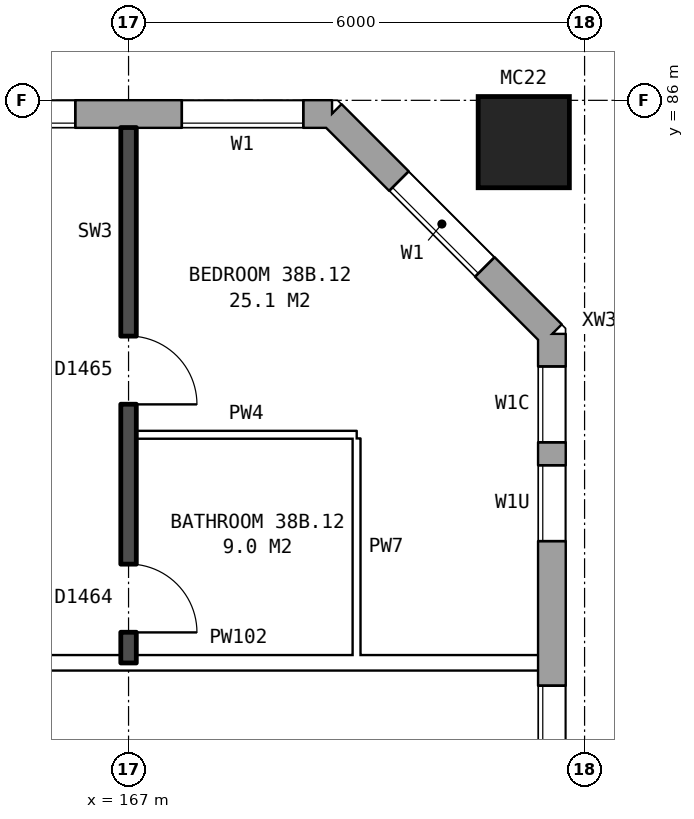
"""IFC4 building model, lengths in metres.
Left out: names, types, materials, properties, quantities, classifications, styles, units other than length and angle.
Written with IfcOpenShell. Run it as: python <this file> out.ifc"""

import sys

from ifc_helpers import new_model, si_unit, direction, frame, frame_2d, origin, origin_2d, place, context, subcontext, project, spatial, rectangle, hollow_rectangle, extrude, element, fill, save


model = new_model("IFC4")
c1 = context("Model", 3, precision=1e-05, world=origin(), true_north=direction((0.0, 1.0)))
c2 = subcontext(c1, "Body", "Model", "MODEL_VIEW")
j1 = project(units=[si_unit("LENGTHUNIT", "METRE"), si_unit("PLANEANGLEUNIT", "RADIAN")], contexts=[c1])
p1 = place(None, origin())
s1 = spatial("IfcSite", under=j1, at=p1, CompositionType="ELEMENT")
p2 = place(p1, origin())
s2 = spatial("IfcBuilding", under=s1, at=p2, CompositionType="ELEMENT")
p3 = place(p2, frame((0.0, 0.0, 136.1)))
s3 = spatial("IfcBuildingStorey", under=s2, at=p3, CompositionType="ELEMENT", Elevation=136.1)
p4 = place(p3, frame((172.2, 85.45, 0.0), z_axis=(0.0, 0.0, 1.0), x_axis=(1.0, 0.0, 0.0)))
e1 = element("IfcColumn", 1, at=p4, inside=s3, PredefinedType="COLUMN", context=c2, shape_type="SweptSolid", body=[
    extrude(hollow_rectangle(XDim=1.2, YDim=1.2, WallThickness=0.065, at=origin_2d()), origin(), (0.0, 0.0, 1.0), 3.1),
])
p5 = place(p3, frame((172.57, 57.075, 0.0), z_axis=(0.0, 0.0, 1.0), x_axis=(0.0, 1.0, 0.0)))
e2 = element("IfcWall", 2, at=p5, inside=s3, PredefinedType="STANDARD", context=c2, shape_type="SweptSolid", body=[
    extrude(rectangle(XDim=25.851, YDim=0.36, at=frame_2d((12.925, 0.0))), origin(), (0.0, 0.0, 1.0), 2.85),
])
p6 = place(p5, frame((0.3, 0.0, 0.8)))
e3 = element("IfcOpeningElement", 3, at=p6, cuts=e2, PredefinedType="OPENING", context=c2, shape_type="SweptSolid", body=[
    extrude(rectangle(XDim=1.2, YDim=1.8, at=frame_2d((0.6, 0.9))), frame((0.0, 0.19, 0.0), z_axis=(0.0, -1.0, 0.0), x_axis=(1.0, 0.0, 0.0)), (0.0, 0.0, 1.0), 0.38),
])
p7 = place(p5, frame((4.625, 0.0, 0.8)))
e4 = element("IfcOpeningElement", 4, at=p7, cuts=e2, PredefinedType="OPENING", context=c2, shape_type="SweptSolid", body=[
    extrude(rectangle(XDim=1.6, YDim=1.8, at=frame_2d((0.8, 0.9))), frame((0.0, 0.19, 0.0), z_axis=(0.0, -1.0, 0.0), x_axis=(1.0, 0.0, 0.0)), (0.0, 0.0, 1.0), 0.38),
])
p8 = place(p5, frame((7.625, 0.0, 0.8)))
e5 = element("IfcOpeningElement", 5, at=p8, cuts=e2, PredefinedType="OPENING", context=c2, shape_type="SweptSolid", body=[
    extrude(rectangle(XDim=1.6, YDim=1.8, at=frame_2d((0.8, 0.9))), frame((0.0, 0.19, 0.0), z_axis=(0.0, -1.0, 0.0), x_axis=(1.0, 0.0, 0.0)), (0.0, 0.0, 1.0), 0.38),
])
p9 = place(p5, frame((10.625, 0.0, 0.8)))
e6 = element("IfcOpeningElement", 6, at=p9, cuts=e2, PredefinedType="OPENING", context=c2, shape_type="SweptSolid", body=[
    extrude(rectangle(XDim=1.6, YDim=1.8, at=frame_2d((0.8, 0.9))), frame((0.0, 0.19, 0.0), z_axis=(0.0, -1.0, 0.0), x_axis=(1.0, 0.0, 0.0)), (0.0, 0.0, 1.0), 0.38),
])
p10 = place(p5, frame((13.625, 0.0, 0.8)))
e7 = element("IfcOpeningElement", 7, at=p10, cuts=e2, PredefinedType="OPENING", context=c2, shape_type="SweptSolid", body=[
    extrude(rectangle(XDim=1.6, YDim=1.8, at=frame_2d((0.8, 0.9))), frame((0.0, 0.19, 0.0), z_axis=(0.0, -1.0, 0.0), x_axis=(1.0, 0.0, 0.0)), (0.0, 0.0, 1.0), 0.38),
])
p11 = place(p5, frame((16.625, 0.0, 0.8)))
e8 = element("IfcOpeningElement", 8, at=p11, cuts=e2, PredefinedType="OPENING", context=c2, shape_type="SweptSolid", body=[
    extrude(rectangle(XDim=1.6, YDim=1.8, at=frame_2d((0.8, 0.9))), frame((0.0, 0.19, 0.0), z_axis=(0.0, -1.0, 0.0), x_axis=(1.0, 0.0, 0.0)), (0.0, 0.0, 1.0), 0.38),
])
p12 = place(p5, frame((19.625, 0.0, 0.8)))
e9 = element("IfcOpeningElement", 9, at=p12, cuts=e2, PredefinedType="OPENING", context=c2, shape_type="SweptSolid", body=[
    extrude(rectangle(XDim=1.6, YDim=1.8, at=frame_2d((0.8, 0.9))), frame((0.0, 0.19, 0.0), z_axis=(0.0, -1.0, 0.0), x_axis=(1.0, 0.0, 0.0)), (0.0, 0.0, 1.0), 0.38),
])
p13 = place(p5, frame((23.125, 0.0, 0.8)))
e10 = element("IfcOpeningElement", 10, at=p13, cuts=e2, PredefinedType="OPENING", context=c2, shape_type="SweptSolid", body=[
    extrude(rectangle(XDim=1.0, YDim=0.9, at=frame_2d((0.5, 0.45))), frame((0.0, 0.19, 0.0), z_axis=(0.0, -1.0, 0.0), x_axis=(1.0, 0.0, 0.0)), (0.0, 0.0, 1.0), 0.38),
])
p14 = place(p5, frame((1.8, 0.0, 0.8)))
e11 = element("IfcOpeningElement", 11, at=p14, cuts=e2, PredefinedType="OPENING", context=c2, shape_type="SweptSolid", body=[
    extrude(rectangle(XDim=0.8, YDim=0.9, at=frame_2d((0.4, 0.45))), frame((0.0, 0.19, 0.0), z_axis=(0.0, -1.0, 0.0), x_axis=(1.0, 0.0, 0.0)), (0.0, 0.0, 1.0), 0.38),
])
p15 = place(p5, frame((24.425, 0.0, 0.8)))
e12 = element("IfcOpeningElement", 12, at=p15, cuts=e2, PredefinedType="OPENING", context=c2, shape_type="SweptSolid", body=[
    extrude(rectangle(XDim=1.0, YDim=1.8, at=frame_2d((0.5, 0.9))), frame((0.0, 0.19, 0.0), z_axis=(0.0, -1.0, 0.0), x_axis=(1.0, 0.0, 0.0)), (0.0, 0.0, 1.0), 0.38),
])
p16 = place(p3, frame((172.57, 82.925, 0.0), z_axis=(0.0, 0.0, 1.0), x_axis=(-0.707106781187, 0.707106781187, 0.0)))
e13 = element("IfcWall", 13, at=p16, inside=s3, PredefinedType="STANDARD", context=c2, shape_type="SweptSolid", body=[
    extrude(rectangle(XDim=4.094, YDim=0.36, at=frame_2d((2.047, 0.0))), origin(), (0.0, 0.0, 1.0), 2.85),
])
p17 = place(p16, frame((1.247, 0.0, 0.8)))
e14 = element("IfcOpeningElement", 14, at=p17, cuts=e13, PredefinedType="OPENING", context=c2, shape_type="SweptSolid", body=[
    extrude(rectangle(XDim=1.6, YDim=1.8, at=frame_2d((0.8, 0.9))), frame((0.0, 0.19, 0.0), z_axis=(0.0, -1.0, 0.0), x_axis=(1.0, 0.0, 0.0)), (0.0, 0.0, 1.0), 0.38),
])
p18 = place(p3, frame((169.675, 85.82, 0.0), z_axis=(0.0, 0.0, 1.0), x_axis=(-1.0, 0.0, 0.0)))
e15 = element("IfcWall", 15, at=p18, inside=s3, PredefinedType="STANDARD", context=c2, shape_type="SweptSolid", body=[
    extrude(rectangle(XDim=35.601, YDim=0.36, at=frame_2d((17.8, 0.0))), origin(), (0.0, 0.0, 1.0), 2.85),
])
p19 = place(p18, frame((0.375, 0.0, 0.8)))
e16 = element("IfcOpeningElement", 16, at=p19, cuts=e15, PredefinedType="OPENING", context=c2, shape_type="SweptSolid", body=[
    extrude(rectangle(XDim=1.6, YDim=1.8, at=frame_2d((0.8, 0.9))), frame((0.0, 0.19, 0.0), z_axis=(0.0, -1.0, 0.0), x_axis=(1.0, 0.0, 0.0)), (0.0, 0.0, 1.0), 0.38),
])
p20 = place(p18, frame((3.375, 0.0, 0.8)))
e17 = element("IfcOpeningElement", 17, at=p20, cuts=e15, PredefinedType="OPENING", context=c2, shape_type="SweptSolid", body=[
    extrude(rectangle(XDim=1.6, YDim=1.8, at=frame_2d((0.8, 0.9))), frame((0.0, 0.19, 0.0), z_axis=(0.0, -1.0, 0.0), x_axis=(1.0, 0.0, 0.0)), (0.0, 0.0, 1.0), 0.38),
])
p21 = place(p18, frame((6.375, 0.0, 0.8)))
e18 = element("IfcOpeningElement", 18, at=p21, cuts=e15, PredefinedType="OPENING", context=c2, shape_type="SweptSolid", body=[
    extrude(rectangle(XDim=1.6, YDim=1.8, at=frame_2d((0.8, 0.9))), frame((0.0, 0.19, 0.0), z_axis=(0.0, -1.0, 0.0), x_axis=(1.0, 0.0, 0.0)), (0.0, 0.0, 1.0), 0.38),
])
p22 = place(p18, frame((9.375, 0.0, 0.8)))
e19 = element("IfcOpeningElement", 19, at=p22, cuts=e15, PredefinedType="OPENING", context=c2, shape_type="SweptSolid", body=[
    extrude(rectangle(XDim=1.6, YDim=1.8, at=frame_2d((0.8, 0.9))), frame((0.0, 0.19, 0.0), z_axis=(0.0, -1.0, 0.0), x_axis=(1.0, 0.0, 0.0)), (0.0, 0.0, 1.0), 0.38),
])
p23 = place(p18, frame((11.275, 0.0, 0.8)))
e20 = element("IfcOpeningElement", 20, at=p23, cuts=e15, PredefinedType="OPENING", context=c2, shape_type="SweptSolid", body=[
    extrude(rectangle(XDim=1.2, YDim=1.8, at=frame_2d((0.6, 0.9))), frame((0.0, 0.19, 0.0), z_axis=(0.0, -1.0, 0.0), x_axis=(1.0, 0.0, 0.0)), (0.0, 0.0, 1.0), 0.38),
])
p24 = place(p18, frame((15.375, 0.0, 0.8)))
e21 = element("IfcOpeningElement", 21, at=p24, cuts=e15, PredefinedType="OPENING", context=c2, shape_type="SweptSolid", body=[
    extrude(rectangle(XDim=1.6, YDim=1.8, at=frame_2d((0.8, 0.9))), frame((0.0, 0.19, 0.0), z_axis=(0.0, -1.0, 0.0), x_axis=(1.0, 0.0, 0.0)), (0.0, 0.0, 1.0), 0.38),
])
p25 = place(p18, frame((18.375, 0.0, 0.8)))
e22 = element("IfcOpeningElement", 22, at=p25, cuts=e15, PredefinedType="OPENING", context=c2, shape_type="SweptSolid", body=[
    extrude(rectangle(XDim=1.6, YDim=1.8, at=frame_2d((0.8, 0.9))), frame((0.0, 0.19, 0.0), z_axis=(0.0, -1.0, 0.0), x_axis=(1.0, 0.0, 0.0)), (0.0, 0.0, 1.0), 0.38),
])
p26 = place(p18, frame((20.875, 0.0, 0.35)))
e23 = element("IfcOpeningElement", 23, at=p26, cuts=e15, PredefinedType="OPENING", context=c2, shape_type="SweptSolid", body=[
    extrude(rectangle(XDim=0.6, YDim=0.9, at=frame_2d((0.3, 0.45))), frame((0.0, 0.19, 0.0), z_axis=(0.0, -1.0, 0.0), x_axis=(1.0, 0.0, 0.0)), (0.0, 0.0, 1.0), 0.38),
])
p27 = place(p18, frame((24.375, 0.0, 0.8)))
e24 = element("IfcOpeningElement", 24, at=p27, cuts=e15, PredefinedType="OPENING", context=c2, shape_type="SweptSolid", body=[
    extrude(rectangle(XDim=1.6, YDim=1.8, at=frame_2d((0.8, 0.9))), frame((0.0, 0.19, 0.0), z_axis=(0.0, -1.0, 0.0), x_axis=(1.0, 0.0, 0.0)), (0.0, 0.0, 1.0), 0.38),
])
p28 = place(p18, frame((27.375, 0.0, 0.8)))
e25 = element("IfcOpeningElement", 25, at=p28, cuts=e15, PredefinedType="OPENING", context=c2, shape_type="SweptSolid", body=[
    extrude(rectangle(XDim=1.6, YDim=1.8, at=frame_2d((0.8, 0.9))), frame((0.0, 0.19, 0.0), z_axis=(0.0, -1.0, 0.0), x_axis=(1.0, 0.0, 0.0)), (0.0, 0.0, 1.0), 0.38),
])
p29 = place(p18, frame((30.375, 0.0, 0.8)))
e26 = element("IfcOpeningElement", 26, at=p29, cuts=e15, PredefinedType="OPENING", context=c2, shape_type="SweptSolid", body=[
    extrude(rectangle(XDim=1.6, YDim=1.8, at=frame_2d((0.8, 0.9))), frame((0.0, 0.19, 0.0), z_axis=(0.0, -1.0, 0.0), x_axis=(1.0, 0.0, 0.0)), (0.0, 0.0, 1.0), 0.38),
])
p30 = place(p18, frame((33.375, 0.0, 0.8)))
e27 = element("IfcOpeningElement", 27, at=p30, cuts=e15, PredefinedType="OPENING", context=c2, shape_type="SweptSolid", body=[
    extrude(rectangle(XDim=1.6, YDim=1.8, at=frame_2d((0.8, 0.9))), frame((0.0, 0.19, 0.0), z_axis=(0.0, -1.0, 0.0), x_axis=(1.0, 0.0, 0.0)), (0.0, 0.0, 1.0), 0.38),
])
p31 = place(p18, frame((12.775, 0.0, 1.6)))
e28 = element("IfcOpeningElement", 28, at=p31, cuts=e15, PredefinedType="OPENING", context=c2, shape_type="SweptSolid", body=[
    extrude(rectangle(XDim=0.6, YDim=0.9, at=frame_2d((0.3, 0.45))), frame((0.0, 0.19, 0.0), z_axis=(0.0, -1.0, 0.0), x_axis=(1.0, 0.0, 0.0)), (0.0, 0.0, 1.0), 0.38),
])
p32 = place(p18, frame((22.425, 0.0, 1.35)))
e29 = element("IfcOpeningElement", 29, at=p32, cuts=e15, PredefinedType="OPENING", context=c2, shape_type="SweptSolid", body=[
    extrude(rectangle(XDim=1.0, YDim=1.2, at=frame_2d((0.5, 0.6))), frame((0.0, 0.19, 0.0), z_axis=(0.0, -1.0, 0.0), x_axis=(1.0, 0.0, 0.0)), (0.0, 0.0, 1.0), 0.38),
])
p33 = place(p3, frame((155.1, 78.6, 0.0), z_axis=(0.0, 0.0, 1.0), x_axis=(1.0, 0.0, 0.0)))
e30 = element("IfcWall", 30, at=p33, inside=s3, PredefinedType="PARTITIONING", context=c2, shape_type="SweptSolid", body=[
    extrude(rectangle(XDim=17.29, YDim=0.2, at=frame_2d((8.645, 0.0))), origin(), (0.0, 0.0, 1.0), 2.85),
])
p34 = place(p33, frame((1.45, 0.0, 0.0)))
e31 = element("IfcOpeningElement", 31, at=p34, cuts=e30, PredefinedType="OPENING", context=c2, shape_type="SweptSolid", body=[
    extrude(rectangle(XDim=1.0, YDim=2.1, at=frame_2d((0.5, 1.05))), frame((0.0, 0.11, 0.0), z_axis=(0.0, -1.0, 0.0), x_axis=(1.0, 0.0, 0.0)), (0.0, 0.0, 1.0), 0.22),
])
p35 = place(p33, frame((8.4, 0.0, 0.0)))
e32 = element("IfcOpeningElement", 32, at=p35, cuts=e30, PredefinedType="OPENING", context=c2, shape_type="SweptSolid", body=[
    extrude(rectangle(XDim=1.0, YDim=2.1, at=frame_2d((0.5, 1.05))), frame((0.0, 0.11, 0.0), z_axis=(0.0, -1.0, 0.0), x_axis=(1.0, 0.0, 0.0)), (0.0, 0.0, 1.0), 0.22),
])
p36 = place(p3, frame((167.1, 81.6, 0.0), z_axis=(0.0, 0.0, 1.0), x_axis=(1.0, 0.0, 0.0)))
e33 = element("IfcWall", 33, at=p36, inside=s3, PredefinedType="PARTITIONING", context=c2, shape_type="SweptSolid", body=[
    extrude(rectangle(XDim=2.9, YDim=0.1, at=frame_2d((1.45, 0.0))), origin(), (0.0, 0.0, 1.0), 2.85),
])
p37 = place(p3, frame((167.0, 78.6, 0.0), z_axis=(0.0, 0.0, 1.0), x_axis=(0.0, 1.0, 0.0)))
e34 = element("IfcWall", 34, at=p37, inside=s3, PredefinedType="SOLIDWALL", context=c2, shape_type="SweptSolid", body=[
    extrude(rectangle(XDim=7.04, YDim=0.2, at=frame_2d((3.52, 0.0))), origin(), (0.0, 0.0, 1.0), 2.85),
])
p38 = place(p37, frame((3.4, 0.0, 0.0)))
e35 = element("IfcOpeningElement", 35, at=p38, cuts=e34, PredefinedType="OPENING", context=c2, shape_type="SweptSolid", body=[
    extrude(rectangle(XDim=0.9, YDim=2.1, at=frame_2d((0.45, 1.05))), frame((0.0, 0.11, 0.0), z_axis=(0.0, -1.0, 0.0), x_axis=(1.0, 0.0, 0.0)), (0.0, 0.0, 1.0), 0.22),
])
p39 = place(p37, frame((0.4, 0.0, 0.0)))
e36 = element("IfcOpeningElement", 36, at=p39, cuts=e34, PredefinedType="OPENING", context=c2, shape_type="SweptSolid", body=[
    extrude(rectangle(XDim=0.9, YDim=2.1, at=frame_2d((0.45, 1.05))), frame((0.0, 0.11, 0.0), z_axis=(0.0, -1.0, 0.0), x_axis=(1.0, 0.0, 0.0)), (0.0, 0.0, 1.0), 0.22),
])
p40 = place(p3, frame((170.0, 78.7, 0.0), z_axis=(0.0, 0.0, 1.0), x_axis=(0.0, 1.0, 0.0)))
e37 = element("IfcWall", 37, at=p40, inside=s3, PredefinedType="PARTITIONING", context=c2, shape_type="SweptSolid", body=[
    extrude(rectangle(XDim=2.85, YDim=0.1, at=frame_2d((1.425, 0.0))), origin(), (0.0, 0.0, 1.0), 2.85),
])
p41 = place(p12, origin())
e38 = element("IfcWindow", 38, at=p41, inside=s3, PartitioningType="SINGLE_PANEL", PredefinedType="WINDOW", context=c2, shape_type="SweptSolid", body=[
    extrude(rectangle(XDim=1.6, YDim=1.8, at=frame_2d((0.8, 0.9))), frame((0.0, 0.15, 0.0), z_axis=(0.0, -1.0, 0.0), x_axis=(1.0, 0.0, 0.0)), (0.0, 0.0, 1.0), 0.06),
])
fill(e9, e38)
p42 = place(p13, origin())
e39 = element("IfcWindow", 39, at=p42, inside=s3, PartitioningType="SINGLE_PANEL", PredefinedType="WINDOW", context=c2, shape_type="SweptSolid", body=[
    extrude(rectangle(XDim=1.0, YDim=0.9, at=frame_2d((0.5, 0.45))), frame((0.0, 0.15, 0.0), z_axis=(0.0, -1.0, 0.0), x_axis=(1.0, 0.0, 0.0)), (0.0, 0.0, 1.0), 0.06),
])
fill(e10, e39)
p43 = place(p17, origin())
e40 = element("IfcWindow", 40, at=p43, inside=s3, PartitioningType="SINGLE_PANEL", PredefinedType="WINDOW", context=c2, shape_type="SweptSolid", body=[
    extrude(rectangle(XDim=1.6, YDim=1.8, at=frame_2d((0.8, 0.9))), frame((0.0, 0.15, 0.0), z_axis=(0.0, -1.0, 0.0), x_axis=(1.0, 0.0, 0.0)), (0.0, 0.0, 1.0), 0.06),
])
fill(e14, e40)
p44 = place(p19, origin())
e41 = element("IfcWindow", 41, at=p44, inside=s3, PartitioningType="SINGLE_PANEL", PredefinedType="WINDOW", context=c2, shape_type="SweptSolid", body=[
    extrude(rectangle(XDim=1.6, YDim=1.8, at=frame_2d((0.8, 0.9))), frame((0.0, 0.15, 0.0), z_axis=(0.0, -1.0, 0.0), x_axis=(1.0, 0.0, 0.0)), (0.0, 0.0, 1.0), 0.06),
])
fill(e16, e41)
p45 = place(p20, origin())
e42 = element("IfcWindow", 42, at=p45, inside=s3, PartitioningType="SINGLE_PANEL", PredefinedType="WINDOW", context=c2, shape_type="SweptSolid", body=[
    extrude(rectangle(XDim=1.6, YDim=1.8, at=frame_2d((0.8, 0.9))), frame((0.0, 0.15, 0.0), z_axis=(0.0, -1.0, 0.0), x_axis=(1.0, 0.0, 0.0)), (0.0, 0.0, 1.0), 0.06),
])
fill(e17, e42)
p46 = place(p38, frame((0.9, 0.0, 0.0), z_axis=(0.0, 0.0, 1.0), x_axis=(-1.0, 0.0, 0.0)))
e43 = element("IfcDoor", 43, at=p46, inside=s3, OperationType="SINGLE_SWING_RIGHT", PredefinedType="DOOR", context=c2, shape_type="SweptSolid", body=[
    extrude(rectangle(XDim=0.9, YDim=2.1, at=frame_2d((0.45, 1.05))), frame((0.0, 0.025, 0.0), z_axis=(0.0, -1.0, 0.0), x_axis=(1.0, 0.0, 0.0)), (0.0, 0.0, 1.0), 0.05),
])
fill(e35, e43)
p47 = place(p39, frame((0.9, 0.0, 0.0), z_axis=(0.0, 0.0, 1.0), x_axis=(-1.0, 0.0, 0.0)))
e44 = element("IfcDoor", 44, at=p47, inside=s3, OperationType="SINGLE_SWING_RIGHT", PredefinedType="DOOR", context=c2, shape_type="SweptSolid", body=[
    extrude(rectangle(XDim=0.9, YDim=2.1, at=frame_2d((0.45, 1.05))), frame((0.0, 0.025, 0.0), z_axis=(0.0, -1.0, 0.0), x_axis=(1.0, 0.0, 0.0)), (0.0, 0.0, 1.0), 0.05),
])
fill(e36, e44)
p48 = place(p15, origin())
e45 = element("IfcWindow", 45, at=p48, inside=s3, PartitioningType="SINGLE_PANEL", PredefinedType="WINDOW", context=c2, shape_type="SweptSolid", body=[
    extrude(rectangle(XDim=1.0, YDim=1.8, at=frame_2d((0.5, 0.9))), frame((0.0, 0.15, 0.0), z_axis=(0.0, -1.0, 0.0), x_axis=(1.0, 0.0, 0.0)), (0.0, 0.0, 1.0), 0.06),
])
fill(e12, e45)
save(model, sys.argv[1])
